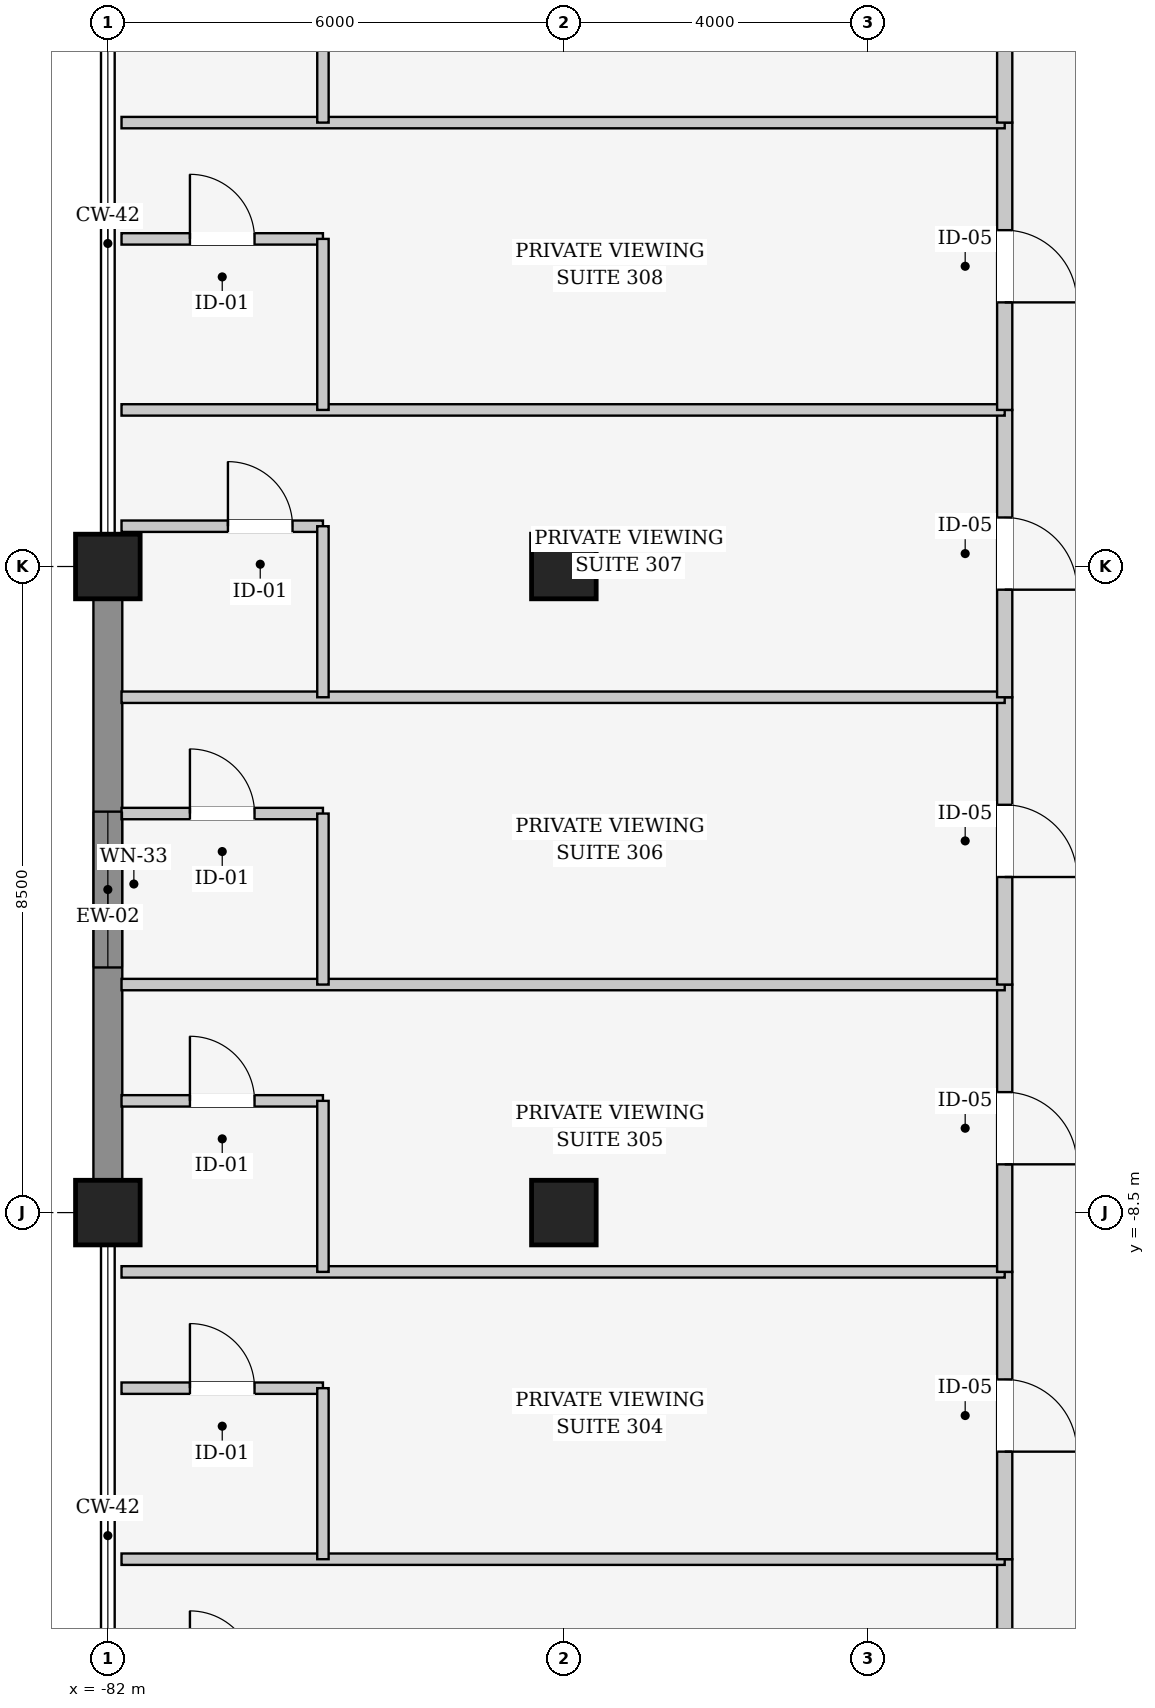
"""IFC4 building model, lengths in metres.
Left out: names, types, materials, properties, quantities, classifications, styles, units other than length and angle.
Written with IfcOpenShell. Run it as: python <this file> out.ifc"""

import sys

from ifc_helpers import new_model, si_unit, direction, frame, frame_2d, origin, origin_2d, place, context, subcontext, project, spatial, rectangle, extrude, element, fill, save


model = new_model("IFC4")
c1 = context("Model", 3, precision=1e-05, world=origin(), true_north=direction((0.0, 1.0)))
c2 = subcontext(c1, "Body", "Model", "MODEL_VIEW")
j1 = project(units=[si_unit("LENGTHUNIT", "METRE"), si_unit("PLANEANGLEUNIT", "RADIAN")], contexts=[c1])
p1 = place(None, origin())
s1 = spatial("IfcSite", under=j1, at=p1, CompositionType="ELEMENT")
p2 = place(p1, origin())
s2 = spatial("IfcBuilding", under=s1, at=p2, CompositionType="ELEMENT")
p3 = place(p2, frame((0.0, 0.0, 16.2)))
s3 = spatial("IfcBuildingStorey", under=s2, at=p3, CompositionType="ELEMENT", Elevation=16.2)
for number, where, z_axis, x_axis in (
    (1, (-82.0, -8.5, 0.0), (0.0, 0.0, 1.0), (1.0, 0.0, 0.0)),
    (2, (-82.0, 0.0, 0.0), (0.0, 0.0, 1.0), (1.0, 0.0, 0.0)),
    (3, (-76.0, -8.5, 0.0), (0.0, 0.0, 1.0), (1.0, 0.0, 0.0)),
    (4, (-76.0, 0.0, 0.0), (0.0, 0.0, 1.0), (1.0, 0.0, 0.0)),
):
    element("IfcColumn", number, at=place(p3, frame(where, z_axis=z_axis, x_axis=x_axis)), inside=s3, PredefinedType="COLUMN", context=c2, shape_type="SweptSolid", body=[
        extrude(rectangle(XDim=0.85, YDim=0.85, at=origin_2d()), origin(), (0.0, 0.0, 1.0), 4.8),
    ])
p4 = place(p3, frame((-82.0, -8.093, 0.0), z_axis=(0.0, 0.0, 1.0), x_axis=(0.0, 1.0, 0.0)))
e5 = element("IfcWall", 5, at=p4, inside=s3, PredefinedType="SOLIDWALL", context=c2, shape_type="SweptSolid", body=[
    extrude(rectangle(XDim=7.686, YDim=0.38, at=frame_2d((3.843, 0.0))), origin(), (0.0, 0.0, 1.0), 3.76),
])
p5 = place(p4, frame((2.818, 0.0, 0.9)))
e6 = element("IfcOpeningElement", 6, at=p5, cuts=e5, PredefinedType="OPENING", context=c2, shape_type="SweptSolid", body=[
    extrude(rectangle(XDim=2.05, YDim=2.0, at=frame_2d((1.025, 1.0))), frame((0.0, 0.2, 0.0), z_axis=(0.0, -1.0, 0.0), x_axis=(1.0, 0.0, 0.0)), (0.0, 0.0, 1.0), 0.4),
])
p6 = place(p3, frame((-70.2, -13.06, 0.0), z_axis=(0.0, 0.0, 1.0), x_axis=(0.0, -1.0, 0.0)))
e7 = element("IfcWall", 7, at=p6, inside=s3, PredefinedType="PARTITIONING", context=c2, shape_type="SweptSolid", body=[
    extrude(rectangle(XDim=3.78, YDim=0.2, at=frame_2d((1.89, 0.0))), origin(), (0.0, 0.0, 1.0), 3.545),
])
p7 = place(p6, frame((1.415, 0.0, 0.0)))
e8 = element("IfcOpeningElement", 8, at=p7, cuts=e7, PredefinedType="OPENING", context=c2, shape_type="SweptSolid", body=[
    extrude(rectangle(XDim=0.95, YDim=2.25, at=frame_2d((0.475, 1.125))), frame((0.0, 0.11, 0.0), z_axis=(0.0, -1.0, 0.0), x_axis=(1.0, 0.0, 0.0)), (0.0, 0.0, 1.0), 0.22),
])
p8 = place(p3, frame((-81.82, -13.06, 0.0), z_axis=(0.0, 0.0, 1.0), x_axis=(1.0, 0.0, 0.0)))
e9 = element("IfcWall", 9, at=p8, inside=s3, PredefinedType="PARTITIONING", context=c2, shape_type="SweptSolid", body=[
    extrude(rectangle(XDim=11.62, YDim=0.15, at=frame_2d((5.81, 0.0))), origin(), (0.0, 0.0, 1.0), 3.845),
])
p9 = place(p3, frame((-81.82, -10.81, 0.0), z_axis=(0.0, 0.0, 1.0), x_axis=(1.0, 0.0, 0.0)))
e10 = element("IfcWall", 10, at=p9, inside=s3, PredefinedType="PARTITIONING", context=c2, shape_type="SweptSolid", body=[
    extrude(rectangle(XDim=2.65, YDim=0.15, at=frame_2d((1.325, 0.0))), origin(), (0.0, 0.0, 1.0), 3.845),
])
p10 = place(p9, frame((0.9, 0.0, 0.0)))
e11 = element("IfcOpeningElement", 11, at=p10, cuts=e10, PredefinedType="OPENING", context=c2, shape_type="SweptSolid", body=[
    extrude(rectangle(XDim=0.85, YDim=2.15, at=frame_2d((0.425, 1.075))), frame((0.0, 0.085, 0.0), z_axis=(0.0, -1.0, 0.0), x_axis=(1.0, 0.0, 0.0)), (0.0, 0.0, 1.0), 0.17),
])
p11 = place(p3, frame((-79.17, -10.81, 0.0), z_axis=(0.0, 0.0, 1.0), x_axis=(0.0, -1.0, 0.0)))
e12 = element("IfcWall", 12, at=p11, inside=s3, PredefinedType="PARTITIONING", context=c2, shape_type="SweptSolid", body=[
    extrude(rectangle(XDim=2.25, YDim=0.15, at=frame_2d((1.125, 0.0))), origin(), (0.0, 0.0, 1.0), 4.182),
])
p12 = place(p3, frame((-70.2, -9.28, 0.0), z_axis=(0.0, 0.0, 1.0), x_axis=(0.0, -1.0, 0.0)))
e13 = element("IfcWall", 13, at=p12, inside=s3, PredefinedType="PARTITIONING", context=c2, shape_type="SweptSolid", body=[
    extrude(rectangle(XDim=3.78, YDim=0.2, at=frame_2d((1.89, 0.0))), origin(), (0.0, 0.0, 1.0), 4.182),
])
p13 = place(p12, frame((1.415, 0.0, 0.0)))
e14 = element("IfcOpeningElement", 14, at=p13, cuts=e13, PredefinedType="OPENING", context=c2, shape_type="SweptSolid", body=[
    extrude(rectangle(XDim=0.95, YDim=2.25, at=frame_2d((0.475, 1.125))), frame((0.0, 0.11, 0.0), z_axis=(0.0, -1.0, 0.0), x_axis=(1.0, 0.0, 0.0)), (0.0, 0.0, 1.0), 0.22),
])
p14 = place(p3, frame((-81.82, -9.28, 0.0), z_axis=(0.0, 0.0, 1.0), x_axis=(1.0, 0.0, 0.0)))
e15 = element("IfcWall", 15, at=p14, inside=s3, PredefinedType="PARTITIONING", context=c2, shape_type="SweptSolid", body=[
    extrude(rectangle(XDim=11.62, YDim=0.15, at=frame_2d((5.81, 0.0))), origin(), (0.0, 0.0, 1.0), 3.845),
])
p15 = place(p3, frame((-81.82, -7.03, 0.0), z_axis=(0.0, 0.0, 1.0), x_axis=(1.0, 0.0, 0.0)))
e16 = element("IfcWall", 16, at=p15, inside=s3, PredefinedType="PARTITIONING", context=c2, shape_type="SweptSolid", body=[
    extrude(rectangle(XDim=2.65, YDim=0.15, at=frame_2d((1.325, 0.0))), origin(), (0.0, 0.0, 1.0), 3.845),
])
p16 = place(p15, frame((0.9, 0.0, 0.0)))
e17 = element("IfcOpeningElement", 17, at=p16, cuts=e16, PredefinedType="OPENING", context=c2, shape_type="SweptSolid", body=[
    extrude(rectangle(XDim=0.85, YDim=2.15, at=frame_2d((0.425, 1.075))), frame((0.0, 0.085, 0.0), z_axis=(0.0, -1.0, 0.0), x_axis=(1.0, 0.0, 0.0)), (0.0, 0.0, 1.0), 0.17),
])
p17 = place(p3, frame((-79.17, -7.03, 0.0), z_axis=(0.0, 0.0, 1.0), x_axis=(0.0, -1.0, 0.0)))
e18 = element("IfcWall", 18, at=p17, inside=s3, PredefinedType="PARTITIONING", context=c2, shape_type="SweptSolid", body=[
    extrude(rectangle(XDim=2.25, YDim=0.15, at=frame_2d((1.125, 0.0))), origin(), (0.0, 0.0, 1.0), 3.745),
])
p18 = place(p3, frame((-70.2, -5.5, 0.0), z_axis=(0.0, 0.0, 1.0), x_axis=(0.0, -1.0, 0.0)))
e19 = element("IfcWall", 19, at=p18, inside=s3, PredefinedType="PARTITIONING", context=c2, shape_type="SweptSolid", body=[
    extrude(rectangle(XDim=3.78, YDim=0.2, at=frame_2d((1.89, 0.0))), origin(), (0.0, 0.0, 1.0), 3.545),
])
p19 = place(p18, frame((1.415, 0.0, 0.0)))
e20 = element("IfcOpeningElement", 20, at=p19, cuts=e19, PredefinedType="OPENING", context=c2, shape_type="SweptSolid", body=[
    extrude(rectangle(XDim=0.95, YDim=2.25, at=frame_2d((0.475, 1.125))), frame((0.0, 0.11, 0.0), z_axis=(0.0, -1.0, 0.0), x_axis=(1.0, 0.0, 0.0)), (0.0, 0.0, 1.0), 0.22),
])
p20 = place(p3, frame((-81.82, -5.5, 0.0), z_axis=(0.0, 0.0, 1.0), x_axis=(1.0, 0.0, 0.0)))
e21 = element("IfcWall", 21, at=p20, inside=s3, PredefinedType="PARTITIONING", context=c2, shape_type="SweptSolid", body=[
    extrude(rectangle(XDim=11.62, YDim=0.15, at=frame_2d((5.81, 0.0))), origin(), (0.0, 0.0, 1.0), 3.845),
])
p21 = place(p3, frame((-81.82, -3.25, 0.0), z_axis=(0.0, 0.0, 1.0), x_axis=(1.0, 0.0, 0.0)))
e22 = element("IfcWall", 22, at=p21, inside=s3, PredefinedType="PARTITIONING", context=c2, shape_type="SweptSolid", body=[
    extrude(rectangle(XDim=2.65, YDim=0.15, at=frame_2d((1.325, 0.0))), origin(), (0.0, 0.0, 1.0), 3.845),
])
p22 = place(p21, frame((0.9, 0.0, 0.0)))
e23 = element("IfcOpeningElement", 23, at=p22, cuts=e22, PredefinedType="OPENING", context=c2, shape_type="SweptSolid", body=[
    extrude(rectangle(XDim=0.85, YDim=2.15, at=frame_2d((0.425, 1.075))), frame((0.0, 0.085, 0.0), z_axis=(0.0, -1.0, 0.0), x_axis=(1.0, 0.0, 0.0)), (0.0, 0.0, 1.0), 0.17),
])
p23 = place(p3, frame((-79.17, -3.25, 0.0), z_axis=(0.0, 0.0, 1.0), x_axis=(0.0, -1.0, 0.0)))
e24 = element("IfcWall", 24, at=p23, inside=s3, PredefinedType="PARTITIONING", context=c2, shape_type="SweptSolid", body=[
    extrude(rectangle(XDim=2.25, YDim=0.15, at=frame_2d((1.125, 0.0))), origin(), (0.0, 0.0, 1.0), 4.182),
])
p24 = place(p3, frame((-70.2, -1.72, 0.0), z_axis=(0.0, 0.0, 1.0), x_axis=(0.0, -1.0, 0.0)))
e25 = element("IfcWall", 25, at=p24, inside=s3, PredefinedType="PARTITIONING", context=c2, shape_type="SweptSolid", body=[
    extrude(rectangle(XDim=3.78, YDim=0.2, at=frame_2d((1.89, 0.0))), origin(), (0.0, 0.0, 1.0), 4.182),
])
p25 = place(p24, frame((1.415, 0.0, 0.0)))
e26 = element("IfcOpeningElement", 26, at=p25, cuts=e25, PredefinedType="OPENING", context=c2, shape_type="SweptSolid", body=[
    extrude(rectangle(XDim=0.95, YDim=2.25, at=frame_2d((0.475, 1.125))), frame((0.0, 0.11, 0.0), z_axis=(0.0, -1.0, 0.0), x_axis=(1.0, 0.0, 0.0)), (0.0, 0.0, 1.0), 0.22),
])
p26 = place(p3, frame((-81.82, -1.72, 0.0), z_axis=(0.0, 0.0, 1.0), x_axis=(1.0, 0.0, 0.0)))
e27 = element("IfcWall", 27, at=p26, inside=s3, PredefinedType="PARTITIONING", context=c2, shape_type="SweptSolid", body=[
    extrude(rectangle(XDim=11.62, YDim=0.15, at=frame_2d((5.81, 0.0))), origin(), (0.0, 0.0, 1.0), 3.845),
])
p27 = place(p3, frame((-81.82, 0.53, 0.0), z_axis=(0.0, 0.0, 1.0), x_axis=(1.0, 0.0, 0.0)))
e28 = element("IfcWall", 28, at=p27, inside=s3, PredefinedType="PARTITIONING", context=c2, shape_type="SweptSolid", body=[
    extrude(rectangle(XDim=2.65, YDim=0.15, at=frame_2d((1.325, 0.0))), origin(), (0.0, 0.0, 1.0), 3.845),
])
p28 = place(p27, frame((1.4, 0.0, 0.0)))
e29 = element("IfcOpeningElement", 29, at=p28, cuts=e28, PredefinedType="OPENING", context=c2, shape_type="SweptSolid", body=[
    extrude(rectangle(XDim=0.85, YDim=2.15, at=frame_2d((0.425, 1.075))), frame((0.0, 0.085, 0.0), z_axis=(0.0, -1.0, 0.0), x_axis=(1.0, 0.0, 0.0)), (0.0, 0.0, 1.0), 0.17),
])
p29 = place(p3, frame((-79.17, 0.53, 0.0), z_axis=(0.0, 0.0, 1.0), x_axis=(0.0, -1.0, 0.0)))
e30 = element("IfcWall", 30, at=p29, inside=s3, PredefinedType="PARTITIONING", context=c2, shape_type="SweptSolid", body=[
    extrude(rectangle(XDim=2.25, YDim=0.15, at=frame_2d((1.125, 0.0))), origin(), (0.0, 0.0, 1.0), 3.745),
])
p30 = place(p3, frame((-70.2, 2.06, 0.0), z_axis=(0.0, 0.0, 1.0), x_axis=(0.0, -1.0, 0.0)))
e31 = element("IfcWall", 31, at=p30, inside=s3, PredefinedType="PARTITIONING", context=c2, shape_type="SweptSolid", body=[
    extrude(rectangle(XDim=3.78, YDim=0.2, at=frame_2d((1.89, 0.0))), origin(), (0.0, 0.0, 1.0), 3.545),
])
p31 = place(p30, frame((1.415, 0.0, 0.0)))
e32 = element("IfcOpeningElement", 32, at=p31, cuts=e31, PredefinedType="OPENING", context=c2, shape_type="SweptSolid", body=[
    extrude(rectangle(XDim=0.95, YDim=2.25, at=frame_2d((0.475, 1.125))), frame((0.0, 0.11, 0.0), z_axis=(0.0, -1.0, 0.0), x_axis=(1.0, 0.0, 0.0)), (0.0, 0.0, 1.0), 0.22),
])
p32 = place(p3, frame((-81.82, 2.06, 0.0), z_axis=(0.0, 0.0, 1.0), x_axis=(1.0, 0.0, 0.0)))
e33 = element("IfcWall", 33, at=p32, inside=s3, PredefinedType="PARTITIONING", context=c2, shape_type="SweptSolid", body=[
    extrude(rectangle(XDim=11.62, YDim=0.15, at=frame_2d((5.81, 0.0))), origin(), (0.0, 0.0, 1.0), 3.845),
])
p33 = place(p3, frame((-81.82, 4.31, 0.0), z_axis=(0.0, 0.0, 1.0), x_axis=(1.0, 0.0, 0.0)))
e34 = element("IfcWall", 34, at=p33, inside=s3, PredefinedType="PARTITIONING", context=c2, shape_type="SweptSolid", body=[
    extrude(rectangle(XDim=2.65, YDim=0.15, at=frame_2d((1.325, 0.0))), origin(), (0.0, 0.0, 1.0), 3.845),
])
p34 = place(p33, frame((0.9, 0.0, 0.0)))
e35 = element("IfcOpeningElement", 35, at=p34, cuts=e34, PredefinedType="OPENING", context=c2, shape_type="SweptSolid", body=[
    extrude(rectangle(XDim=0.85, YDim=2.15, at=frame_2d((0.425, 1.075))), frame((0.0, 0.085, 0.0), z_axis=(0.0, -1.0, 0.0), x_axis=(1.0, 0.0, 0.0)), (0.0, 0.0, 1.0), 0.17),
])
p35 = place(p3, frame((-79.17, 4.31, 0.0), z_axis=(0.0, 0.0, 1.0), x_axis=(0.0, -1.0, 0.0)))
e36 = element("IfcWall", 36, at=p35, inside=s3, PredefinedType="PARTITIONING", context=c2, shape_type="SweptSolid", body=[
    extrude(rectangle(XDim=2.25, YDim=0.15, at=frame_2d((1.125, 0.0))), origin(), (0.0, 0.0, 1.0), 4.182),
])
p36 = place(p3, frame((-70.2, 5.84, 0.0), z_axis=(0.0, 0.0, 1.0), x_axis=(0.0, -1.0, 0.0)))
e37 = element("IfcWall", 37, at=p36, inside=s3, PredefinedType="PARTITIONING", context=c2, shape_type="SweptSolid", body=[
    extrude(rectangle(XDim=3.78, YDim=0.2, at=frame_2d((1.89, 0.0))), origin(), (0.0, 0.0, 1.0), 4.182),
])
p37 = place(p36, frame((1.415, 0.0, 0.0)))
e38 = element("IfcOpeningElement", 38, at=p37, cuts=e37, PredefinedType="OPENING", context=c2, shape_type="SweptSolid", body=[
    extrude(rectangle(XDim=0.95, YDim=2.25, at=frame_2d((0.475, 1.125))), frame((0.0, 0.11, 0.0), z_axis=(0.0, -1.0, 0.0), x_axis=(1.0, 0.0, 0.0)), (0.0, 0.0, 1.0), 0.22),
])
p38 = place(p3, frame((-81.82, 5.84, 0.0), z_axis=(0.0, 0.0, 1.0), x_axis=(1.0, 0.0, 0.0)))
e39 = element("IfcWall", 39, at=p38, inside=s3, PredefinedType="PARTITIONING", context=c2, shape_type="SweptSolid", body=[
    extrude(rectangle(XDim=11.62, YDim=0.15, at=frame_2d((5.81, 0.0))), origin(), (0.0, 0.0, 1.0), 3.845),
])
p39 = place(p3, frame((-79.17, 8.09, 0.0), z_axis=(0.0, 0.0, 1.0), x_axis=(0.0, -1.0, 0.0)))
e40 = element("IfcWall", 40, at=p39, inside=s3, PredefinedType="PARTITIONING", context=c2, shape_type="SweptSolid", body=[
    extrude(rectangle(XDim=2.25, YDim=0.15, at=frame_2d((1.125, 0.0))), origin(), (0.0, 0.0, 1.0), 3.745),
])
p40 = place(p3, frame((-70.2, 9.62, 0.0), z_axis=(0.0, 0.0, 1.0), x_axis=(0.0, -1.0, 0.0)))
e41 = element("IfcWall", 41, at=p40, inside=s3, PredefinedType="PARTITIONING", context=c2, shape_type="SweptSolid", body=[
    extrude(rectangle(XDim=3.78, YDim=0.2, at=frame_2d((1.89, 0.0))), origin(), (0.0, 0.0, 1.0), 3.545),
])
p41 = place(p40, frame((1.415, 0.0, 0.0)))
e42 = element("IfcOpeningElement", 42, at=p41, cuts=e41, PredefinedType="OPENING", context=c2, shape_type="SweptSolid", body=[
    extrude(rectangle(XDim=0.95, YDim=2.25, at=frame_2d((0.475, 1.125))), frame((0.0, 0.11, 0.0), z_axis=(0.0, -1.0, 0.0), x_axis=(1.0, 0.0, 0.0)), (0.0, 0.0, 1.0), 0.22),
])
p42 = place(p5, origin())
e43 = element("IfcWindow", 43, at=p42, inside=s3, PartitioningType="SINGLE_PANEL", PredefinedType="WINDOW", context=c2, shape_type="SweptSolid", body=[
    extrude(rectangle(XDim=2.05, YDim=2.0, at=frame_2d((1.025, 1.0))), frame((0.0, 0.03, 0.0), z_axis=(0.0, -1.0, 0.0), x_axis=(1.0, 0.0, 0.0)), (0.0, 0.0, 1.0), 0.06),
])
fill(e6, e43)
p43 = place(p10, origin())
e44 = element("IfcDoor", 44, at=p43, inside=s3, OperationType="SINGLE_SWING_LEFT", PredefinedType="DOOR", context=c2, shape_type="SweptSolid", body=[
    extrude(rectangle(XDim=0.85, YDim=2.15, at=frame_2d((0.425, 1.075))), frame((0.0, 0.025, 0.0), z_axis=(0.0, -1.0, 0.0), x_axis=(1.0, 0.0, 0.0)), (0.0, 0.0, 1.0), 0.05),
])
fill(e11, e44)
p44 = place(p13, origin())
e45 = element("IfcDoor", 45, at=p44, inside=s3, OperationType="SINGLE_SWING_RIGHT", PredefinedType="DOOR", context=c2, shape_type="SweptSolid", body=[
    extrude(rectangle(XDim=0.95, YDim=2.25, at=frame_2d((0.475, 1.125))), frame((0.0, 0.025, 0.0), z_axis=(0.0, -1.0, 0.0), x_axis=(1.0, 0.0, 0.0)), (0.0, 0.0, 1.0), 0.05),
])
fill(e14, e45)
p45 = place(p16, origin())
e46 = element("IfcDoor", 46, at=p45, inside=s3, OperationType="SINGLE_SWING_LEFT", PredefinedType="DOOR", context=c2, shape_type="SweptSolid", body=[
    extrude(rectangle(XDim=0.85, YDim=2.15, at=frame_2d((0.425, 1.075))), frame((0.0, 0.025, 0.0), z_axis=(0.0, -1.0, 0.0), x_axis=(1.0, 0.0, 0.0)), (0.0, 0.0, 1.0), 0.05),
])
fill(e17, e46)
p46 = place(p19, origin())
e47 = element("IfcDoor", 47, at=p46, inside=s3, OperationType="SINGLE_SWING_RIGHT", PredefinedType="DOOR", context=c2, shape_type="SweptSolid", body=[
    extrude(rectangle(XDim=0.95, YDim=2.25, at=frame_2d((0.475, 1.125))), frame((0.0, 0.025, 0.0), z_axis=(0.0, -1.0, 0.0), x_axis=(1.0, 0.0, 0.0)), (0.0, 0.0, 1.0), 0.05),
])
fill(e20, e47)
p47 = place(p22, origin())
e48 = element("IfcDoor", 48, at=p47, inside=s3, OperationType="SINGLE_SWING_LEFT", PredefinedType="DOOR", context=c2, shape_type="SweptSolid", body=[
    extrude(rectangle(XDim=0.85, YDim=2.15, at=frame_2d((0.425, 1.075))), frame((0.0, 0.025, 0.0), z_axis=(0.0, -1.0, 0.0), x_axis=(1.0, 0.0, 0.0)), (0.0, 0.0, 1.0), 0.05),
])
fill(e23, e48)
p48 = place(p25, origin())
e49 = element("IfcDoor", 49, at=p48, inside=s3, OperationType="SINGLE_SWING_RIGHT", PredefinedType="DOOR", context=c2, shape_type="SweptSolid", body=[
    extrude(rectangle(XDim=0.95, YDim=2.25, at=frame_2d((0.475, 1.125))), frame((0.0, 0.025, 0.0), z_axis=(0.0, -1.0, 0.0), x_axis=(1.0, 0.0, 0.0)), (0.0, 0.0, 1.0), 0.05),
])
fill(e26, e49)
p49 = place(p28, origin())
e50 = element("IfcDoor", 50, at=p49, inside=s3, OperationType="SINGLE_SWING_LEFT", PredefinedType="DOOR", context=c2, shape_type="SweptSolid", body=[
    extrude(rectangle(XDim=0.85, YDim=2.15, at=frame_2d((0.425, 1.075))), frame((0.0, 0.025, 0.0), z_axis=(0.0, -1.0, 0.0), x_axis=(1.0, 0.0, 0.0)), (0.0, 0.0, 1.0), 0.05),
])
fill(e29, e50)
p50 = place(p31, origin())
e51 = element("IfcDoor", 51, at=p50, inside=s3, OperationType="SINGLE_SWING_RIGHT", PredefinedType="DOOR", context=c2, shape_type="SweptSolid", body=[
    extrude(rectangle(XDim=0.95, YDim=2.25, at=frame_2d((0.475, 1.125))), frame((0.0, 0.025, 0.0), z_axis=(0.0, -1.0, 0.0), x_axis=(1.0, 0.0, 0.0)), (0.0, 0.0, 1.0), 0.05),
])
fill(e32, e51)
p51 = place(p34, origin())
e52 = element("IfcDoor", 52, at=p51, inside=s3, OperationType="SINGLE_SWING_LEFT", PredefinedType="DOOR", context=c2, shape_type="SweptSolid", body=[
    extrude(rectangle(XDim=0.85, YDim=2.15, at=frame_2d((0.425, 1.075))), frame((0.0, 0.025, 0.0), z_axis=(0.0, -1.0, 0.0), x_axis=(1.0, 0.0, 0.0)), (0.0, 0.0, 1.0), 0.05),
])
fill(e35, e52)
p52 = place(p37, origin())
e53 = element("IfcDoor", 53, at=p52, inside=s3, OperationType="SINGLE_SWING_RIGHT", PredefinedType="DOOR", context=c2, shape_type="SweptSolid", body=[
    extrude(rectangle(XDim=0.95, YDim=2.25, at=frame_2d((0.475, 1.125))), frame((0.0, 0.025, 0.0), z_axis=(0.0, -1.0, 0.0), x_axis=(1.0, 0.0, 0.0)), (0.0, 0.0, 1.0), 0.05),
])
fill(e38, e53)
save(model, sys.argv[1])
